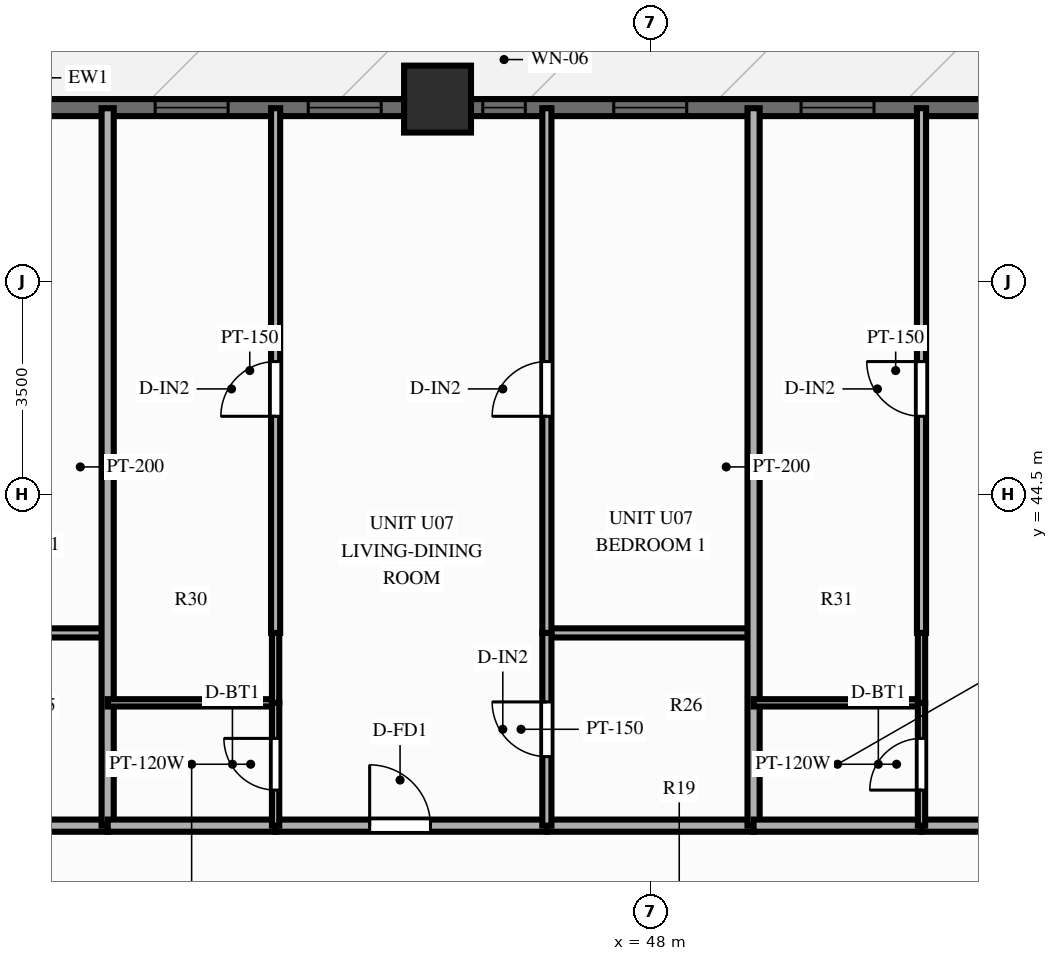
"""IFC4 building model, lengths in metres.
Left out: names, types, materials, properties, quantities, classifications, styles, units other than length and angle.
Written with IfcOpenShell. Run it as: python <this file> out.ifc"""

import sys

from ifc_helpers import new_model, si_unit, direction, frame, frame_2d, origin, origin_2d, place, context, subcontext, project, spatial, rectangle, extrude, source, transform, mapped, element, fill, save


model = new_model("IFC4")
c1 = context("Model", 3, precision=1e-05, world=origin(), true_north=direction((0.0, 1.0)))
c2 = subcontext(c1, "Body", "Model", "MODEL_VIEW")
j1 = project(units=[si_unit("LENGTHUNIT", "METRE"), si_unit("PLANEANGLEUNIT", "RADIAN")], contexts=[c1])
p1 = place(None, origin())
s1 = spatial("IfcSite", under=j1, at=p1, CompositionType="ELEMENT")
p2 = place(p1, origin())
s2 = spatial("IfcBuilding", under=s1, at=p2, CompositionType="ELEMENT")
p3 = place(p2, frame((0.0, 0.0, 34.4)))
s3 = spatial("IfcBuildingStorey", under=s2, at=p3, CompositionType="ELEMENT", Elevation=34.4)
m1 = source(origin(), c2, "Body", "SweptSolid", [
    extrude(rectangle(XDim=1.1, YDim=1.1, at=origin_2d()), origin(), (0.0, 0.0, 1.0), 3.0),
])
p4 = place(p3, frame((44.5, 51.0, 0.0), z_axis=(0.0, 0.0, 1.0), x_axis=(1.0, 0.0, 0.0)))
e1 = element("IfcColumn", 1, at=p4, inside=s3, PredefinedType="COLUMN", context=c2, shape_type="MappedRepresentation", body=[
    mapped(m1, transform((0.0, 0.0, 0.0), scale=1.0)),
])
p5 = place(p3, frame((15.5, 50.86, 0.0), z_axis=(0.0, 0.0, 1.0), x_axis=(1.0, 0.0, 0.0)))
e2 = element("IfcWall", 2, at=p5, inside=s3, PredefinedType="SOLIDWALL", context=c2, shape_type="SweptSolid", body=[
    extrude(rectangle(XDim=45.0, YDim=0.28, at=frame_2d((22.5, 0.0))), origin(), (0.0, 0.0, 1.0), 2.28),
])
p6 = place(p5, frame((0.76, 0.0, 0.25)))
e3 = element("IfcOpeningElement", 3, at=p6, cuts=e2, PredefinedType="OPENING", context=c2, shape_type="SweptSolid", body=[
    extrude(rectangle(XDim=1.2, YDim=1.5, at=frame_2d((0.6, 0.75))), frame((0.0, 0.152, 0.0), z_axis=(0.0, -1.0, 0.0), x_axis=(1.0, 0.0, 0.0)), (0.0, 0.0, 1.0), 0.304),
])
p7 = place(p5, frame((3.111, 0.0, 0.25)))
e4 = element("IfcOpeningElement", 4, at=p7, cuts=e2, PredefinedType="OPENING", context=c2, shape_type="SweptSolid", body=[
    extrude(rectangle(XDim=1.2, YDim=1.5, at=frame_2d((0.6, 0.75))), frame((0.0, 0.152, 0.0), z_axis=(0.0, -1.0, 0.0), x_axis=(1.0, 0.0, 0.0)), (0.0, 0.0, 1.0), 0.304),
])
p8 = place(p5, frame((6.723, 0.0, 0.25)))
e5 = element("IfcOpeningElement", 5, at=p8, cuts=e2, PredefinedType="OPENING", context=c2, shape_type="SweptSolid", body=[
    extrude(rectangle(XDim=1.2, YDim=1.5, at=frame_2d((0.6, 0.75))), frame((0.0, 0.152, 0.0), z_axis=(0.0, -1.0, 0.0), x_axis=(1.0, 0.0, 0.0)), (0.0, 0.0, 1.0), 0.304),
])
p9 = place(p5, frame((10.653, 0.0, 0.25)))
e6 = element("IfcOpeningElement", 6, at=p9, cuts=e2, PredefinedType="OPENING", context=c2, shape_type="SweptSolid", body=[
    extrude(rectangle(XDim=1.2, YDim=1.5, at=frame_2d((0.6, 0.75))), frame((0.0, 0.152, 0.0), z_axis=(0.0, -1.0, 0.0), x_axis=(1.0, 0.0, 0.0)), (0.0, 0.0, 1.0), 0.304),
])
p10 = place(p5, frame((13.681, 0.0, 0.25)))
e7 = element("IfcOpeningElement", 7, at=p10, cuts=e2, PredefinedType="OPENING", context=c2, shape_type="SweptSolid", body=[
    extrude(rectangle(XDim=1.2, YDim=1.5, at=frame_2d((0.6, 0.75))), frame((0.0, 0.152, 0.0), z_axis=(0.0, -1.0, 0.0), x_axis=(1.0, 0.0, 0.0)), (0.0, 0.0, 1.0), 0.304),
])
p11 = place(p5, frame((17.683, 0.0, 0.25)))
e8 = element("IfcOpeningElement", 8, at=p11, cuts=e2, PredefinedType="OPENING", context=c2, shape_type="SweptSolid", body=[
    extrude(rectangle(XDim=1.2, YDim=1.5, at=frame_2d((0.6, 0.75))), frame((0.0, 0.152, 0.0), z_axis=(0.0, -1.0, 0.0), x_axis=(1.0, 0.0, 0.0)), (0.0, 0.0, 1.0), 0.304),
])
p12 = place(p5, frame((21.325, 0.0, 0.0)))
e9 = element("IfcOpeningElement", 9, at=p12, cuts=e2, PredefinedType="OPENING", context=c2, shape_type="SweptSolid", body=[
    extrude(rectangle(XDim=1.1, YDim=2.15, at=frame_2d((0.55, 1.075))), frame((0.0, 0.152, 0.0), z_axis=(0.0, -1.0, 0.0), x_axis=(1.0, 0.0, 0.0)), (0.0, 0.0, 1.0), 0.304),
])
p13 = place(p5, frame((24.356, 0.0, 0.25)))
e10 = element("IfcOpeningElement", 10, at=p13, cuts=e2, PredefinedType="OPENING", context=c2, shape_type="SweptSolid", body=[
    extrude(rectangle(XDim=1.2, YDim=1.5, at=frame_2d((0.6, 0.75))), frame((0.0, 0.152, 0.0), z_axis=(0.0, -1.0, 0.0), x_axis=(1.0, 0.0, 0.0)), (0.0, 0.0, 1.0), 0.304),
])
p14 = place(p5, frame((26.873, 0.0, 0.25)))
e11 = element("IfcOpeningElement", 11, at=p14, cuts=e2, PredefinedType="OPENING", context=c2, shape_type="SweptSolid", body=[
    extrude(rectangle(XDim=1.2, YDim=1.5, at=frame_2d((0.6, 0.75))), frame((0.0, 0.152, 0.0), z_axis=(0.0, -1.0, 0.0), x_axis=(1.0, 0.0, 0.0)), (0.0, 0.0, 1.0), 0.304),
])
p15 = place(p5, frame((29.744, 0.0, 0.25)))
e12 = element("IfcOpeningElement", 12, at=p15, cuts=e2, PredefinedType="OPENING", context=c2, shape_type="SweptSolid", body=[
    extrude(rectangle(XDim=0.7, YDim=1.5, at=frame_2d((0.35, 0.75))), frame((0.0, 0.152, 0.0), z_axis=(0.0, -1.0, 0.0), x_axis=(1.0, 0.0, 0.0)), (0.0, 0.0, 1.0), 0.304),
])
p16 = place(p5, frame((31.898, 0.0, 0.25)))
e13 = element("IfcOpeningElement", 13, at=p16, cuts=e2, PredefinedType="OPENING", context=c2, shape_type="SweptSolid", body=[
    extrude(rectangle(XDim=1.2, YDim=1.5, at=frame_2d((0.6, 0.75))), frame((0.0, 0.152, 0.0), z_axis=(0.0, -1.0, 0.0), x_axis=(1.0, 0.0, 0.0)), (0.0, 0.0, 1.0), 0.304),
])
p17 = place(p5, frame((34.979, 0.0, 0.25)))
e14 = element("IfcOpeningElement", 14, at=p17, cuts=e2, PredefinedType="OPENING", context=c2, shape_type="SweptSolid", body=[
    extrude(rectangle(XDim=1.2, YDim=1.5, at=frame_2d((0.6, 0.75))), frame((0.0, 0.152, 0.0), z_axis=(0.0, -1.0, 0.0), x_axis=(1.0, 0.0, 0.0)), (0.0, 0.0, 1.0), 0.304),
])
p18 = place(p5, frame((38.59, 0.0, 0.25)))
e15 = element("IfcOpeningElement", 15, at=p18, cuts=e2, PredefinedType="OPENING", context=c2, shape_type="SweptSolid", body=[
    extrude(rectangle(XDim=1.2, YDim=1.5, at=frame_2d((0.6, 0.75))), frame((0.0, 0.152, 0.0), z_axis=(0.0, -1.0, 0.0), x_axis=(1.0, 0.0, 0.0)), (0.0, 0.0, 1.0), 0.304),
])
p19 = place(p5, frame((42.415, 0.0, 0.25)))
e16 = element("IfcOpeningElement", 16, at=p19, cuts=e2, PredefinedType="OPENING", context=c2, shape_type="SweptSolid", body=[
    extrude(rectangle(XDim=1.2, YDim=1.5, at=frame_2d((0.6, 0.75))), frame((0.0, 0.152, 0.0), z_axis=(0.0, -1.0, 0.0), x_axis=(1.0, 0.0, 0.0)), (0.0, 0.0, 1.0), 0.304),
])
p20 = place(p3, frame((35.676, 39.05, 0.0), z_axis=(0.0, 0.0, 1.0), x_axis=(1.0, 0.0, 0.0)))
e17 = element("IfcWall", 17, at=p20, inside=s3, PredefinedType="PARTITIONING", context=c2, shape_type="SweptSolid", body=[
    extrude(rectangle(XDim=3.399, YDim=0.2, at=frame_2d((1.7, 0.0))), origin(), (0.0, 0.0, 1.0), 2.79),
])
p21 = place(p3, frame((35.676, 42.22, 0.0), z_axis=(0.0, 0.0, 1.0), x_axis=(1.0, 0.0, 0.0)))
e18 = element("IfcWall", 18, at=p21, inside=s3, PredefinedType="PARTITIONING", context=c2, shape_type="SweptSolid", body=[
    extrude(rectangle(XDim=3.399, YDim=0.15, at=frame_2d((1.7, 0.0))), origin(), (0.0, 0.0, 1.0), 2.79),
])
p22 = place(p3, frame((39.075, 39.05, 0.0), z_axis=(0.0, 0.0, 1.0), x_axis=(0.0, 1.0, 0.0)))
e19 = element("IfcWall", 19, at=p22, inside=s3, PredefinedType="PARTITIONING", context=c2, shape_type="SweptSolid", body=[
    extrude(rectangle(XDim=11.8, YDim=0.2, at=frame_2d((5.9, 0.0))), origin(), (0.0, 0.0, 1.0), 2.79),
])
p23 = place(p3, frame((39.075, 39.05, 0.0), z_axis=(0.0, 0.0, 1.0), x_axis=(1.0, 0.0, 0.0)))
e20 = element("IfcWall", 20, at=p23, inside=s3, PredefinedType="PARTITIONING", context=c2, shape_type="SweptSolid", body=[
    extrude(rectangle(XDim=2.762, YDim=0.2, at=frame_2d((1.381, 0.0))), origin(), (0.0, 0.0, 1.0), 2.79),
])
p24 = place(p3, frame((41.837, 39.05, 0.0), z_axis=(0.0, 0.0, 1.0), x_axis=(1.0, 0.0, 0.0)))
e21 = element("IfcWall", 21, at=p24, inside=s3, PredefinedType="PARTITIONING", context=c2, shape_type="SweptSolid", body=[
    extrude(rectangle(XDim=4.461, YDim=0.2, at=frame_2d((2.231, 0.0))), origin(), (0.0, 0.0, 1.0), 2.79),
])
p25 = place(p24, frame((1.547, 0.0, 0.0)))
e22 = element("IfcOpeningElement", 22, at=p25, cuts=e21, PredefinedType="OPENING", context=c2, shape_type="SweptSolid", body=[
    extrude(rectangle(XDim=1.0, YDim=2.15, at=frame_2d((0.5, 1.075))), frame((0.0, 0.112, 0.0), z_axis=(0.0, -1.0, 0.0), x_axis=(1.0, 0.0, 0.0)), (0.0, 0.0, 1.0), 0.224),
])
p26 = place(p3, frame((46.298, 39.05, 0.0), z_axis=(0.0, 0.0, 1.0), x_axis=(1.0, 0.0, 0.0)))
e23 = element("IfcWall", 23, at=p26, inside=s3, PredefinedType="PARTITIONING", context=c2, shape_type="SweptSolid", body=[
    extrude(rectangle(XDim=3.399, YDim=0.2, at=frame_2d((1.7, 0.0))), origin(), (0.0, 0.0, 1.0), 2.79),
])
p27 = place(p3, frame((39.075, 41.07, 0.0), z_axis=(0.0, 0.0, 1.0), x_axis=(1.0, 0.0, 0.0)))
e24 = element("IfcWall", 24, at=p27, inside=s3, PredefinedType="PARTITIONING", context=c2, shape_type="SweptSolid", body=[
    extrude(rectangle(XDim=2.762, YDim=0.12, at=frame_2d((1.381, 0.0))), origin(), (0.0, 0.0, 1.0), 2.79),
])
p28 = place(p3, frame((46.298, 42.22, 0.0), z_axis=(0.0, 0.0, 1.0), x_axis=(1.0, 0.0, 0.0)))
e25 = element("IfcWall", 25, at=p28, inside=s3, PredefinedType="PARTITIONING", context=c2, shape_type="SweptSolid", body=[
    extrude(rectangle(XDim=3.399, YDim=0.15, at=frame_2d((1.7, 0.0))), origin(), (0.0, 0.0, 1.0), 2.79),
])
p29 = place(p3, frame((41.837, 39.05, 0.0), z_axis=(0.0, 0.0, 1.0), x_axis=(0.0, 1.0, 0.0)))
e26 = element("IfcWall", 26, at=p29, inside=s3, PredefinedType="PARTITIONING", context=c2, shape_type="SweptSolid", body=[
    extrude(rectangle(XDim=2.02, YDim=0.12, at=frame_2d((1.01, 0.0))), origin(), (0.0, 0.0, 1.0), 2.79),
])
p30 = place(p29, frame((0.585, 0.0, 0.0)))
e27 = element("IfcOpeningElement", 27, at=p30, cuts=e26, PredefinedType="OPENING", context=c2, shape_type="SweptSolid", body=[
    extrude(rectangle(XDim=0.85, YDim=2.05, at=frame_2d((0.425, 1.025))), frame((0.0, 0.072, 0.0), z_axis=(0.0, -1.0, 0.0), x_axis=(1.0, 0.0, 0.0)), (0.0, 0.0, 1.0), 0.144),
])
p31 = place(p3, frame((41.837, 41.07, 0.0), z_axis=(0.0, 0.0, 1.0), x_axis=(0.0, 1.0, 0.0)))
e28 = element("IfcWall", 28, at=p31, inside=s3, PredefinedType="PARTITIONING", context=c2, shape_type="SweptSolid", body=[
    extrude(rectangle(XDim=1.15, YDim=0.12, at=frame_2d((0.575, 0.0))), origin(), (0.0, 0.0, 1.0), 2.79),
])
p32 = place(p3, frame((41.837, 42.22, 0.0), z_axis=(0.0, 0.0, 1.0), x_axis=(0.0, 1.0, 0.0)))
e29 = element("IfcWall", 29, at=p32, inside=s3, PredefinedType="PARTITIONING", context=c2, shape_type="SweptSolid", body=[
    extrude(rectangle(XDim=8.63, YDim=0.15, at=frame_2d((4.315, 0.0))), origin(), (0.0, 0.0, 1.0), 2.79),
])
p33 = place(p32, frame((3.563, 0.0, 0.0)))
e30 = element("IfcOpeningElement", 30, at=p33, cuts=e29, PredefinedType="OPENING", context=c2, shape_type="SweptSolid", body=[
    extrude(rectangle(XDim=0.9, YDim=2.1, at=frame_2d((0.45, 1.05))), frame((0.0, 0.087, 0.0), z_axis=(0.0, -1.0, 0.0), x_axis=(1.0, 0.0, 0.0)), (0.0, 0.0, 1.0), 0.174),
])
p34 = place(p3, frame((46.298, 39.05, 0.0), z_axis=(0.0, 0.0, 1.0), x_axis=(0.0, 1.0, 0.0)))
e31 = element("IfcWall", 31, at=p34, inside=s3, PredefinedType="PARTITIONING", context=c2, shape_type="SweptSolid", body=[
    extrude(rectangle(XDim=3.17, YDim=0.15, at=frame_2d((1.585, 0.0))), origin(), (0.0, 0.0, 1.0), 2.79),
])
p35 = place(p34, frame((1.135, 0.0, 0.0)))
e32 = element("IfcOpeningElement", 32, at=p35, cuts=e31, PredefinedType="OPENING", context=c2, shape_type="SweptSolid", body=[
    extrude(rectangle(XDim=0.9, YDim=2.1, at=frame_2d((0.45, 1.05))), frame((0.0, 0.087, 0.0), z_axis=(0.0, -1.0, 0.0), x_axis=(1.0, 0.0, 0.0)), (0.0, 0.0, 1.0), 0.174),
])
p36 = place(p3, frame((46.298, 42.22, 0.0), z_axis=(0.0, 0.0, 1.0), x_axis=(0.0, 1.0, 0.0)))
e33 = element("IfcWall", 33, at=p36, inside=s3, PredefinedType="PARTITIONING", context=c2, shape_type="SweptSolid", body=[
    extrude(rectangle(XDim=8.63, YDim=0.15, at=frame_2d((4.315, 0.0))), origin(), (0.0, 0.0, 1.0), 2.79),
])
p37 = place(p36, frame((3.563, 0.0, 0.0)))
e34 = element("IfcOpeningElement", 34, at=p37, cuts=e33, PredefinedType="OPENING", context=c2, shape_type="SweptSolid", body=[
    extrude(rectangle(XDim=0.9, YDim=2.1, at=frame_2d((0.45, 1.05))), frame((0.0, 0.087, 0.0), z_axis=(0.0, -1.0, 0.0), x_axis=(1.0, 0.0, 0.0)), (0.0, 0.0, 1.0), 0.174),
])
p38 = place(p3, frame((49.698, 39.05, 0.0), z_axis=(0.0, 0.0, 1.0), x_axis=(0.0, 1.0, 0.0)))
e35 = element("IfcWall", 35, at=p38, inside=s3, PredefinedType="PARTITIONING", context=c2, shape_type="SweptSolid", body=[
    extrude(rectangle(XDim=11.8, YDim=0.2, at=frame_2d((5.9, 0.0))), origin(), (0.0, 0.0, 1.0), 2.79),
])
p39 = place(p3, frame((49.698, 39.05, 0.0), z_axis=(0.0, 0.0, 1.0), x_axis=(1.0, 0.0, 0.0)))
e36 = element("IfcWall", 36, at=p39, inside=s3, PredefinedType="PARTITIONING", context=c2, shape_type="SweptSolid", body=[
    extrude(rectangle(XDim=2.762, YDim=0.2, at=frame_2d((1.381, 0.0))), origin(), (0.0, 0.0, 1.0), 2.79),
])
p40 = place(p3, frame((52.459, 39.05, 0.0), z_axis=(0.0, 0.0, 1.0), x_axis=(1.0, 0.0, 0.0)))
e37 = element("IfcWall", 37, at=p40, inside=s3, PredefinedType="PARTITIONING", context=c2, shape_type="SweptSolid", body=[
    extrude(rectangle(XDim=4.461, YDim=0.2, at=frame_2d((2.231, 0.0))), origin(), (0.0, 0.0, 1.0), 2.79),
])
p41 = place(p40, frame((1.731, 0.0, 0.0)))
e38 = element("IfcOpeningElement", 38, at=p41, cuts=e37, PredefinedType="OPENING", context=c2, shape_type="SweptSolid", body=[
    extrude(rectangle(XDim=1.0, YDim=2.15, at=frame_2d((0.5, 1.075))), frame((0.0, 0.112, 0.0), z_axis=(0.0, -1.0, 0.0), x_axis=(1.0, 0.0, 0.0)), (0.0, 0.0, 1.0), 0.224),
])
p42 = place(p3, frame((49.698, 41.07, 0.0), z_axis=(0.0, 0.0, 1.0), x_axis=(1.0, 0.0, 0.0)))
e39 = element("IfcWall", 39, at=p42, inside=s3, PredefinedType="PARTITIONING", context=c2, shape_type="SweptSolid", body=[
    extrude(rectangle(XDim=2.762, YDim=0.12, at=frame_2d((1.381, 0.0))), origin(), (0.0, 0.0, 1.0), 2.79),
])
p43 = place(p3, frame((52.459, 39.05, 0.0), z_axis=(0.0, 0.0, 1.0), x_axis=(0.0, 1.0, 0.0)))
e40 = element("IfcWall", 40, at=p43, inside=s3, PredefinedType="PARTITIONING", context=c2, shape_type="SweptSolid", body=[
    extrude(rectangle(XDim=2.02, YDim=0.12, at=frame_2d((1.01, 0.0))), origin(), (0.0, 0.0, 1.0), 2.79),
])
p44 = place(p43, frame((0.585, 0.0, 0.0)))
e41 = element("IfcOpeningElement", 41, at=p44, cuts=e40, PredefinedType="OPENING", context=c2, shape_type="SweptSolid", body=[
    extrude(rectangle(XDim=0.85, YDim=2.05, at=frame_2d((0.425, 1.025))), frame((0.0, 0.072, 0.0), z_axis=(0.0, -1.0, 0.0), x_axis=(1.0, 0.0, 0.0)), (0.0, 0.0, 1.0), 0.144),
])
p45 = place(p3, frame((52.459, 41.07, 0.0), z_axis=(0.0, 0.0, 1.0), x_axis=(0.0, 1.0, 0.0)))
e42 = element("IfcWall", 42, at=p45, inside=s3, PredefinedType="PARTITIONING", context=c2, shape_type="SweptSolid", body=[
    extrude(rectangle(XDim=1.15, YDim=0.12, at=frame_2d((0.575, 0.0))), origin(), (0.0, 0.0, 1.0), 2.79),
])
p46 = place(p3, frame((52.459, 42.22, 0.0), z_axis=(0.0, 0.0, 1.0), x_axis=(0.0, 1.0, 0.0)))
e43 = element("IfcWall", 43, at=p46, inside=s3, PredefinedType="PARTITIONING", context=c2, shape_type="SweptSolid", body=[
    extrude(rectangle(XDim=8.63, YDim=0.15, at=frame_2d((4.315, 0.0))), origin(), (0.0, 0.0, 1.0), 2.79),
])
p47 = place(p46, frame((3.563, 0.0, 0.0)))
e44 = element("IfcOpeningElement", 44, at=p47, cuts=e43, PredefinedType="OPENING", context=c2, shape_type="SweptSolid", body=[
    extrude(rectangle(XDim=0.9, YDim=2.1, at=frame_2d((0.45, 1.05))), frame((0.0, 0.087, 0.0), z_axis=(0.0, -1.0, 0.0), x_axis=(1.0, 0.0, 0.0)), (0.0, 0.0, 1.0), 0.174),
])
m2 = source(origin(), c2, "Body", "SweptSolid", [
    extrude(rectangle(XDim=1.2, YDim=1.5, at=frame_2d((0.6, 0.75))), frame((0.0, 0.03, 0.0), z_axis=(0.0, -1.0, 0.0), x_axis=(1.0, 0.0, 0.0)), (0.0, 0.0, 1.0), 0.06),
])
p48 = place(p13, origin())
e45 = element("IfcWindow", 45, at=p48, inside=s3, PartitioningType="SINGLE_PANEL", PredefinedType="WINDOW", context=c2, shape_type="MappedRepresentation", body=[
    mapped(m2, transform((0.0, 0.0, 0.0), scale=1.0)),
])
fill(e10, e45)
p49 = place(p14, origin())
e46 = element("IfcWindow", 46, at=p49, inside=s3, PartitioningType="SINGLE_PANEL", PredefinedType="WINDOW", context=c2, shape_type="MappedRepresentation", body=[
    mapped(m2, transform((0.0, 0.0, 0.0), scale=1.0)),
])
fill(e11, e46)
m3 = source(origin(), c2, "Body", "SweptSolid", [
    extrude(rectangle(XDim=0.7, YDim=1.5, at=frame_2d((0.35, 0.75))), frame((0.0, 0.03, 0.0), z_axis=(0.0, -1.0, 0.0), x_axis=(1.0, 0.0, 0.0)), (0.0, 0.0, 1.0), 0.06),
])
p50 = place(p15, origin())
e47 = element("IfcWindow", 47, at=p50, inside=s3, PartitioningType="SINGLE_PANEL", PredefinedType="WINDOW", context=c2, shape_type="MappedRepresentation", body=[
    mapped(m3, transform((0.0, 0.0, 0.0), scale=1.0)),
])
fill(e12, e47)
p51 = place(p16, origin())
e48 = element("IfcWindow", 48, at=p51, inside=s3, PartitioningType="SINGLE_PANEL", PredefinedType="WINDOW", context=c2, shape_type="MappedRepresentation", body=[
    mapped(m2, transform((0.0, 0.0, 0.0), scale=1.0)),
])
fill(e13, e48)
p52 = place(p17, origin())
e49 = element("IfcWindow", 49, at=p52, inside=s3, PartitioningType="SINGLE_PANEL", PredefinedType="WINDOW", context=c2, shape_type="MappedRepresentation", body=[
    mapped(m2, transform((0.0, 0.0, 0.0), scale=1.0)),
])
fill(e14, e49)
m4 = source(origin(), c2, "Body", "SweptSolid", [
    extrude(rectangle(XDim=1.0, YDim=2.15, at=frame_2d((0.5, 1.075))), frame((0.0, 0.025, 0.0), z_axis=(0.0, -1.0, 0.0), x_axis=(1.0, 0.0, 0.0)), (0.0, 0.0, 1.0), 0.05),
])
p53 = place(p25, origin())
e50 = element("IfcDoor", 50, at=p53, inside=s3, OperationType="SINGLE_SWING_LEFT", PredefinedType="DOOR", context=c2, shape_type="MappedRepresentation", body=[
    mapped(m4, transform((0.0, 0.0, 0.0), scale=1.0)),
])
fill(e22, e50)
m5 = source(origin(), c2, "Body", "SweptSolid", [
    extrude(rectangle(XDim=0.85, YDim=2.05, at=frame_2d((0.425, 1.025))), frame((0.0, 0.025, 0.0), z_axis=(0.0, -1.0, 0.0), x_axis=(1.0, 0.0, 0.0)), (0.0, 0.0, 1.0), 0.05),
])
p54 = place(p30, origin())
e51 = element("IfcDoor", 51, at=p54, inside=s3, OperationType="SINGLE_SWING_RIGHT", PredefinedType="DOOR", context=c2, shape_type="MappedRepresentation", body=[
    mapped(m5, transform((0.0, 0.0, 0.0), scale=1.0)),
])
fill(e27, e51)
m6 = source(origin(), c2, "Body", "SweptSolid", [
    extrude(rectangle(XDim=0.9, YDim=2.1, at=frame_2d((0.45, 1.05))), frame((0.0, 0.025, 0.0), z_axis=(0.0, -1.0, 0.0), x_axis=(1.0, 0.0, 0.0)), (0.0, 0.0, 1.0), 0.05),
])
p55 = place(p33, origin())
e52 = element("IfcDoor", 52, at=p55, inside=s3, OperationType="SINGLE_SWING_LEFT", PredefinedType="DOOR", context=c2, shape_type="MappedRepresentation", body=[
    mapped(m6, transform((0.0, 0.0, 0.0), scale=1.0)),
])
fill(e30, e52)
p56 = place(p35, origin())
e53 = element("IfcDoor", 53, at=p56, inside=s3, OperationType="SINGLE_SWING_RIGHT", PredefinedType="DOOR", context=c2, shape_type="MappedRepresentation", body=[
    mapped(m6, transform((0.0, 0.0, 0.0), scale=1.0)),
])
fill(e32, e53)
p57 = place(p37, origin())
e54 = element("IfcDoor", 54, at=p57, inside=s3, OperationType="SINGLE_SWING_LEFT", PredefinedType="DOOR", context=c2, shape_type="MappedRepresentation", body=[
    mapped(m6, transform((0.0, 0.0, 0.0), scale=1.0)),
])
fill(e34, e54)
p58 = place(p44, origin())
e55 = element("IfcDoor", 55, at=p58, inside=s3, OperationType="SINGLE_SWING_LEFT", PredefinedType="DOOR", context=c2, shape_type="MappedRepresentation", body=[
    mapped(m5, transform((0.0, 0.0, 0.0), scale=1.0)),
])
fill(e41, e55)
p59 = place(p47, origin())
e56 = element("IfcDoor", 56, at=p59, inside=s3, OperationType="SINGLE_SWING_RIGHT", PredefinedType="DOOR", context=c2, shape_type="MappedRepresentation", body=[
    mapped(m6, transform((0.0, 0.0, 0.0), scale=1.0)),
])
fill(e44, e56)
save(model, sys.argv[1])
